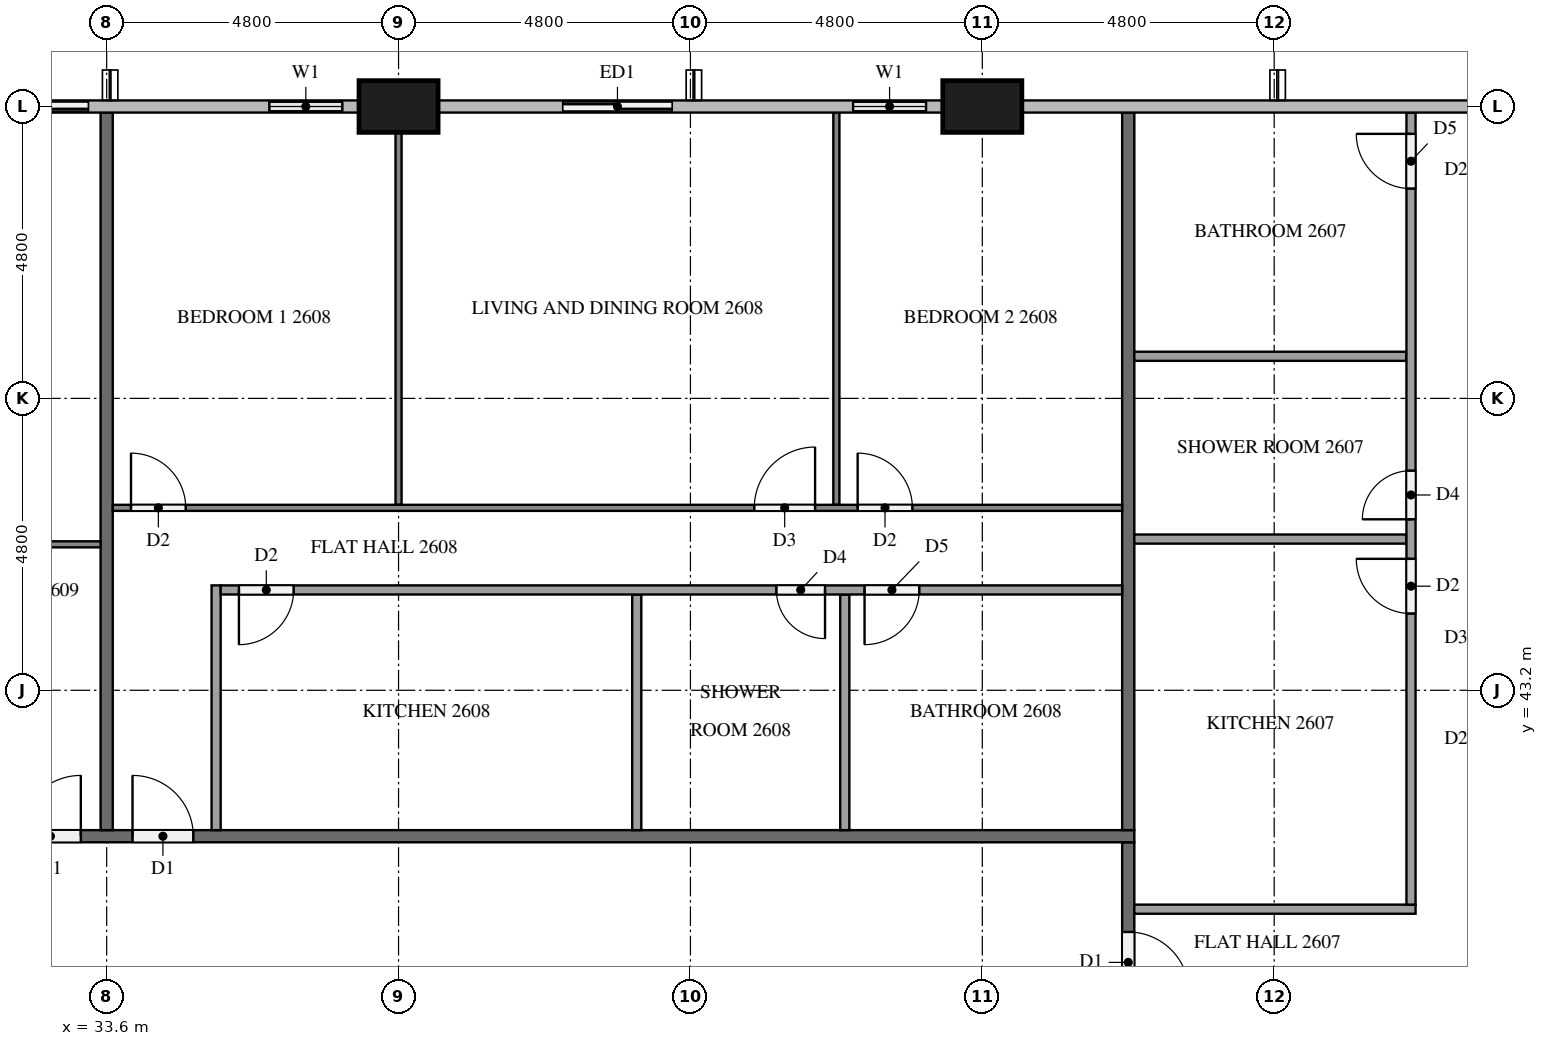
"""IFC4 building model, lengths in metres.
Left out: names, types, materials, properties, quantities, classifications, styles, units other than length and angle.
Written with IfcOpenShell. Run it as: python <this file> out.ifc"""

import sys

from ifc_helpers import new_model, si_unit, direction, frame, frame_2d, origin, origin_2d, place, context, subcontext, project, spatial, rectangle, extrude, element, fill, save


model = new_model("IFC4")
c1 = context("Model", 3, precision=1e-05, world=origin(), true_north=direction((0.0, 1.0)))
c2 = subcontext(c1, "Body", "Model", "MODEL_VIEW")
j1 = project(units=[si_unit("LENGTHUNIT", "METRE"), si_unit("PLANEANGLEUNIT", "RADIAN")], contexts=[c1])
p1 = place(None, origin())
s1 = spatial("IfcSite", under=j1, at=p1, CompositionType="ELEMENT")
p2 = place(p1, origin())
s2 = spatial("IfcBuilding", under=s1, at=p2, CompositionType="ELEMENT")
p3 = place(p2, frame((0.0, 0.0, 103.2)))
s3 = spatial("IfcBuildingStorey", under=s2, at=p3, CompositionType="ELEMENT", Elevation=103.2)
for number, where, z_axis, x_axis in (
    (1, (48.0, 52.8, 0.0), (0.0, 0.0, 1.0), (1.0, 0.0, 0.0)),
    (2, (38.4, 52.8, 0.0), (0.0, 0.0, 1.0), (1.0, 0.0, 0.0)),
):
    element("IfcColumn", number, at=place(p3, frame(where, z_axis=z_axis, x_axis=x_axis)), inside=s3, PredefinedType="COLUMN", context=c2, shape_type="SweptSolid", body=[
        extrude(rectangle(XDim=1.3, YDim=0.85, at=origin_2d()), origin(), (0.0, 0.0, 1.0), 3.2),
    ])
p4 = place(p3, frame((47.35, 52.8, 0.0), z_axis=(0.0, 0.0, 1.0), x_axis=(-1.0, 0.0, 0.0)))
e3 = element("IfcWall", 3, at=p4, inside=s3, PredefinedType="SOLIDWALL", context=c2, shape_type="SweptSolid", body=[
    extrude(rectangle(XDim=1.75, YDim=0.15, at=frame_2d((0.875, 0.0))), origin(), (0.0, 0.0, 1.0), 3.2),
])
p5 = place(p4, frame((0.275, 0.0, 0.9)))
e4 = element("IfcOpeningElement", 4, at=p5, cuts=e3, PredefinedType="OPENING", context=c2, shape_type="SweptSolid", body=[
    extrude(rectangle(XDim=1.2, YDim=1.4, at=frame_2d((0.6, 0.7))), frame((0.0, 0.085, 0.0), z_axis=(0.0, -1.0, 0.0), x_axis=(1.0, 0.0, 0.0)), (0.0, 0.0, 1.0), 0.17),
])
p6 = place(p3, frame((43.2, 52.8, 0.0), z_axis=(0.0, 0.0, 1.0), x_axis=(-1.0, 0.0, 0.0)))
e5 = element("IfcWall", 5, at=p6, inside=s3, PredefinedType="SOLIDWALL", context=c2, shape_type="SweptSolid", body=[
    extrude(rectangle(XDim=2.4, YDim=0.15, at=frame_2d((1.2, 0.0))), origin(), (0.0, 0.0, 1.0), 3.2),
])
p7 = place(p6, frame((0.3, 0.0, 0.0)))
e6 = element("IfcOpeningElement", 6, at=p7, cuts=e5, PredefinedType="OPENING", context=c2, shape_type="SweptSolid", body=[
    extrude(rectangle(XDim=1.8, YDim=2.4, at=frame_2d((0.9, 1.2))), frame((0.0, 0.085, 0.0), z_axis=(0.0, -1.0, 0.0), x_axis=(1.0, 0.0, 0.0)), (0.0, 0.0, 1.0), 0.17),
])
p8 = place(p3, frame((37.75, 52.8, 0.0), z_axis=(0.0, 0.0, 1.0), x_axis=(-1.0, 0.0, 0.0)))
e7 = element("IfcWall", 7, at=p8, inside=s3, PredefinedType="SOLIDWALL", context=c2, shape_type="SweptSolid", body=[
    extrude(rectangle(XDim=1.75, YDim=0.15, at=frame_2d((0.875, 0.0))), origin(), (0.0, 0.0, 1.0), 3.2),
])
p9 = place(p8, frame((0.275, 0.0, 0.9)))
e8 = element("IfcOpeningElement", 8, at=p9, cuts=e7, PredefinedType="OPENING", context=c2, shape_type="SweptSolid", body=[
    extrude(rectangle(XDim=1.2, YDim=1.4, at=frame_2d((0.6, 0.7))), frame((0.0, 0.085, 0.0), z_axis=(0.0, -1.0, 0.0), x_axis=(1.0, 0.0, 0.0)), (0.0, 0.0, 1.0), 0.17),
])
p10 = place(p3, frame((33.6, 52.8, 0.0), z_axis=(0.0, 0.0, 1.0), x_axis=(-1.0, 0.0, 0.0)))
e9 = element("IfcWall", 9, at=p10, inside=s3, PredefinedType="SOLIDWALL", context=c2, shape_type="SweptSolid", body=[
    extrude(rectangle(XDim=2.4, YDim=0.15, at=frame_2d((1.2, 0.0))), origin(), (0.0, 0.0, 1.0), 3.2),
])
p11 = place(p10, frame((0.3, 0.0, 0.0)))
e10 = element("IfcOpeningElement", 10, at=p11, cuts=e9, PredefinedType="OPENING", context=c2, shape_type="SweptSolid", body=[
    extrude(rectangle(XDim=1.8, YDim=2.4, at=frame_2d((0.9, 1.2))), frame((0.0, 0.085, 0.0), z_axis=(0.0, -1.0, 0.0), x_axis=(1.0, 0.0, 0.0)), (0.0, 0.0, 1.0), 0.17),
])
p12 = place(p3, frame((50.4, 40.7, 0.0), z_axis=(0.0, 0.0, 1.0), x_axis=(0.0, -1.0, 0.0)))
e11 = element("IfcWall", 11, at=p12, inside=s3, PredefinedType="PARTITIONING", context=c2, shape_type="SweptSolid", body=[
    extrude(rectangle(XDim=2.8, YDim=0.2, at=frame_2d((1.4, 0.0))), origin(), (0.0, 0.0, 1.0), 3.2),
])
p13 = place(p12, frame((1.475, 0.0, 0.0)))
e12 = element("IfcOpeningElement", 12, at=p13, cuts=e11, PredefinedType="OPENING", context=c2, shape_type="SweptSolid", body=[
    extrude(rectangle(XDim=1.0, YDim=2.1, at=frame_2d((0.5, 1.05))), frame((0.0, 0.11, 0.0), z_axis=(0.0, -1.0, 0.0), x_axis=(1.0, 0.0, 0.0)), (0.0, 0.0, 1.0), 0.22),
])
p14 = place(p3, frame((11.9, 40.8, 0.0), z_axis=(0.0, 0.0, 1.0), x_axis=(1.0, 0.0, 0.0)))
e13 = element("IfcWall", 13, at=p14, inside=s3, PredefinedType="PARTITIONING", context=c2, shape_type="SweptSolid", body=[
    extrude(rectangle(XDim=38.6, YDim=0.2, at=frame_2d((19.3, 0.0))), origin(), (0.0, 0.0, 1.0), 3.2),
])
p15 = place(p14, frame((22.125, 0.0, 0.0)))
e14 = element("IfcOpeningElement", 14, at=p15, cuts=e13, PredefinedType="OPENING", context=c2, shape_type="SweptSolid", body=[
    extrude(rectangle(XDim=1.0, YDim=2.1, at=frame_2d((0.5, 1.05))), frame((0.0, 0.11, 0.0), z_axis=(0.0, -1.0, 0.0), x_axis=(1.0, 0.0, 0.0)), (0.0, 0.0, 1.0), 0.22),
])
p16 = place(p14, frame((20.275, 0.0, 0.0)))
e15 = element("IfcOpeningElement", 15, at=p16, cuts=e13, PredefinedType="OPENING", context=c2, shape_type="SweptSolid", body=[
    extrude(rectangle(XDim=1.0, YDim=2.1, at=frame_2d((0.5, 1.05))), frame((0.0, 0.11, 0.0), z_axis=(0.0, -1.0, 0.0), x_axis=(1.0, 0.0, 0.0)), (0.0, 0.0, 1.0), 0.22),
])
p17 = place(p14, frame((0.525, 0.0, 0.0)))
e16 = element("IfcOpeningElement", 16, at=p17, cuts=e13, PredefinedType="OPENING", context=c2, shape_type="SweptSolid", body=[
    extrude(rectangle(XDim=1.0, YDim=2.1, at=frame_2d((0.5, 1.05))), frame((0.0, 0.11, 0.0), z_axis=(0.0, -1.0, 0.0), x_axis=(1.0, 0.0, 0.0)), (0.0, 0.0, 1.0), 0.22),
])
for number, where, z_axis, x_axis in (
    (17, (50.4, 40.9, 0.0), (0.0, 0.0, 1.0), (0.0, 1.0, 0.0)),
    (18, (33.6, 52.7, 0.0), (0.0, 0.0, 1.0), (0.0, -1.0, 0.0)),
):
    element("IfcWall", number, at=place(p3, frame(where, z_axis=z_axis, x_axis=x_axis)), inside=s3, PredefinedType="PARTITIONING", context=c2, shape_type="SweptSolid", body=[
        extrude(rectangle(XDim=11.8, YDim=0.2, at=frame_2d((5.9, 0.0))), origin(), (0.0, 0.0, 1.0), 3.2),
    ])
for number, where, z_axis, x_axis in (
    (19, (50.5, 45.687, 0.0), (0.0, 0.0, 1.0), (1.0, 0.0, 0.0)),
    (20, (50.5, 48.692, 0.0), (0.0, 0.0, 1.0), (1.0, 0.0, 0.0)),
):
    element("IfcWall", number, at=place(p3, frame(where, z_axis=z_axis, x_axis=x_axis)), inside=s3, PredefinedType="PARTITIONING", context=c2, shape_type="SweptSolid", body=[
        extrude(rectangle(XDim=4.475, YDim=0.15, at=frame_2d((2.238, 0.0))), origin(), (0.0, 0.0, 1.0), 3.2),
    ])
p18 = place(p3, frame((50.5, 39.6, 0.0), z_axis=(0.0, 0.0, 1.0), x_axis=(1.0, 0.0, 0.0)))
e21 = element("IfcWall", 21, at=p18, inside=s3, PredefinedType="PARTITIONING", context=c2, shape_type="SweptSolid", body=[
    extrude(rectangle(XDim=4.625, YDim=0.15, at=frame_2d((2.312, 0.0))), origin(), (0.0, 0.0, 1.0), 3.2),
])
p19 = place(p3, frame((55.05, 39.675, 0.0), z_axis=(0.0, 0.0, 1.0), x_axis=(0.0, 1.0, 0.0)))
e22 = element("IfcWall", 22, at=p19, inside=s3, PredefinedType="PARTITIONING", context=c2, shape_type="SweptSolid", body=[
    extrude(rectangle(XDim=13.025, YDim=0.15, at=frame_2d((6.512, 0.0))), origin(), (0.0, 0.0, 1.0), 3.2),
])
p20 = place(p19, frame((4.787, 0.0, 0.0)))
e23 = element("IfcOpeningElement", 23, at=p20, cuts=e22, PredefinedType="OPENING", context=c2, shape_type="SweptSolid", body=[
    extrude(rectangle(XDim=0.9, YDim=2.1, at=frame_2d((0.45, 1.05))), frame((0.0, 0.085, 0.0), z_axis=(0.0, -1.0, 0.0), x_axis=(1.0, 0.0, 0.0)), (0.0, 0.0, 1.0), 0.17),
])
p21 = place(p19, frame((6.336, 0.0, 0.0)))
e24 = element("IfcOpeningElement", 24, at=p21, cuts=e22, PredefinedType="OPENING", context=c2, shape_type="SweptSolid", body=[
    extrude(rectangle(XDim=0.8, YDim=2.1, at=frame_2d((0.4, 1.05))), frame((0.0, 0.085, 0.0), z_axis=(0.0, -1.0, 0.0), x_axis=(1.0, 0.0, 0.0)), (0.0, 0.0, 1.0), 0.17),
])
p22 = place(p19, frame((11.775, 0.0, 0.0)))
e25 = element("IfcOpeningElement", 25, at=p22, cuts=e22, PredefinedType="OPENING", context=c2, shape_type="SweptSolid", body=[
    extrude(rectangle(XDim=0.9, YDim=2.1, at=frame_2d((0.45, 1.05))), frame((0.0, 0.085, 0.0), z_axis=(0.0, -1.0, 0.0), x_axis=(1.0, 0.0, 0.0)), (0.0, 0.0, 1.0), 0.17),
])
p23 = place(p3, frame((38.4, 46.25, 0.0), z_axis=(0.0, 0.0, 1.0), x_axis=(0.0, 1.0, 0.0)))
e26 = element("IfcWall", 26, at=p23, inside=s3, PredefinedType="PARTITIONING", context=c2, shape_type="SweptSolid", body=[
    extrude(rectangle(XDim=6.125, YDim=0.1, at=frame_2d((3.062, 0.0))), origin(), (0.0, 0.0, 1.0), 3.2),
])
p24 = place(p3, frame((45.6, 46.25, 0.0), z_axis=(0.0, 0.0, 1.0), x_axis=(0.0, 1.0, 0.0)))
e27 = element("IfcWall", 27, at=p24, inside=s3, PredefinedType="PARTITIONING", context=c2, shape_type="SweptSolid", body=[
    extrude(rectangle(XDim=6.45, YDim=0.1, at=frame_2d((3.225, 0.0))), origin(), (0.0, 0.0, 1.0), 3.2),
])
p25 = place(p3, frame((33.7, 46.2, 0.0), z_axis=(0.0, 0.0, 1.0), x_axis=(1.0, 0.0, 0.0)))
e28 = element("IfcWall", 28, at=p25, inside=s3, PredefinedType="PARTITIONING", context=c2, shape_type="SweptSolid", body=[
    extrude(rectangle(XDim=16.6, YDim=0.1, at=frame_2d((8.3, 0.0))), origin(), (0.0, 0.0, 1.0), 3.2),
])
p26 = place(p25, frame((0.3, 0.0, 0.0)))
e29 = element("IfcOpeningElement", 29, at=p26, cuts=e28, PredefinedType="OPENING", context=c2, shape_type="SweptSolid", body=[
    extrude(rectangle(XDim=0.9, YDim=2.1, at=frame_2d((0.45, 1.05))), frame((0.0, 0.06, 0.0), z_axis=(0.0, -1.0, 0.0), x_axis=(1.0, 0.0, 0.0)), (0.0, 0.0, 1.0), 0.12),
])
p27 = place(p25, frame((10.55, 0.0, 0.0)))
e30 = element("IfcOpeningElement", 30, at=p27, cuts=e28, PredefinedType="OPENING", context=c2, shape_type="SweptSolid", body=[
    extrude(rectangle(XDim=1.0, YDim=2.1, at=frame_2d((0.5, 1.05))), frame((0.0, 0.06, 0.0), z_axis=(0.0, -1.0, 0.0), x_axis=(1.0, 0.0, 0.0)), (0.0, 0.0, 1.0), 0.12),
])
p28 = place(p25, frame((12.25, 0.0, 0.0)))
e31 = element("IfcOpeningElement", 31, at=p28, cuts=e28, PredefinedType="OPENING", context=c2, shape_type="SweptSolid", body=[
    extrude(rectangle(XDim=0.9, YDim=2.1, at=frame_2d((0.45, 1.05))), frame((0.0, 0.06, 0.0), z_axis=(0.0, -1.0, 0.0), x_axis=(1.0, 0.0, 0.0)), (0.0, 0.0, 1.0), 0.12),
])
for number, where, z_axis, x_axis in (
    (32, (42.317, 40.9, 0.0), (0.0, 0.0, 1.0), (0.0, 1.0, 0.0)),
    (33, (45.739, 40.9, 0.0), (0.0, 0.0, 1.0), (0.0, 1.0, 0.0)),
):
    element("IfcWall", number, at=place(p3, frame(where, z_axis=z_axis, x_axis=x_axis)), inside=s3, PredefinedType="PARTITIONING", context=c2, shape_type="SweptSolid", body=[
        extrude(rectangle(XDim=3.875, YDim=0.15, at=frame_2d((1.938, 0.0))), origin(), (0.0, 0.0, 1.0), 3.2),
    ])
p29 = place(p3, frame((35.4, 40.9, 0.0), z_axis=(0.0, 0.0, 1.0), x_axis=(0.0, 1.0, 0.0)))
e34 = element("IfcWall", 34, at=p29, inside=s3, PredefinedType="PARTITIONING", context=c2, shape_type="SweptSolid", body=[
    extrude(rectangle(XDim=4.025, YDim=0.15, at=frame_2d((2.013, 0.0))), origin(), (0.0, 0.0, 1.0), 3.2),
])
p30 = place(p3, frame((50.3, 44.85, 0.0), z_axis=(0.0, 0.0, 1.0), x_axis=(-1.0, 0.0, 0.0)))
e35 = element("IfcWall", 35, at=p30, inside=s3, PredefinedType="PARTITIONING", context=c2, shape_type="SweptSolid", body=[
    extrude(rectangle(XDim=14.825, YDim=0.15, at=frame_2d((7.413, 0.0))), origin(), (0.0, 0.0, 1.0), 3.2),
])
p31 = place(p30, frame((13.625, 0.0, 0.0)))
e36 = element("IfcOpeningElement", 36, at=p31, cuts=e35, PredefinedType="OPENING", context=c2, shape_type="SweptSolid", body=[
    extrude(rectangle(XDim=0.9, YDim=2.1, at=frame_2d((0.45, 1.05))), frame((0.0, 0.085, 0.0), z_axis=(0.0, -1.0, 0.0), x_axis=(1.0, 0.0, 0.0)), (0.0, 0.0, 1.0), 0.17),
])
p32 = place(p30, frame((4.886, 0.0, 0.0)))
e37 = element("IfcOpeningElement", 37, at=p32, cuts=e35, PredefinedType="OPENING", context=c2, shape_type="SweptSolid", body=[
    extrude(rectangle(XDim=0.8, YDim=2.1, at=frame_2d((0.4, 1.05))), frame((0.0, 0.085, 0.0), z_axis=(0.0, -1.0, 0.0), x_axis=(1.0, 0.0, 0.0)), (0.0, 0.0, 1.0), 0.17),
])
p33 = place(p30, frame((3.336, 0.0, 0.0)))
e38 = element("IfcOpeningElement", 38, at=p33, cuts=e35, PredefinedType="OPENING", context=c2, shape_type="SweptSolid", body=[
    extrude(rectangle(XDim=0.9, YDim=2.1, at=frame_2d((0.45, 1.05))), frame((0.0, 0.085, 0.0), z_axis=(0.0, -1.0, 0.0), x_axis=(1.0, 0.0, 0.0)), (0.0, 0.0, 1.0), 0.17),
])
p34 = place(p3, frame((21.7, 45.6, 0.0), z_axis=(0.0, 0.0, 1.0), x_axis=(1.0, 0.0, 0.0)))
e39 = element("IfcWall", 39, at=p34, inside=s3, PredefinedType="PARTITIONING", context=c2, shape_type="SweptSolid", body=[
    extrude(rectangle(XDim=11.8, YDim=0.1, at=frame_2d((5.9, 0.0))), origin(), (0.0, 0.0, 1.0), 3.2),
])
p35 = place(p34, frame((5.05, 0.0, 0.0)))
e40 = element("IfcOpeningElement", 40, at=p35, cuts=e39, PredefinedType="OPENING", context=c2, shape_type="SweptSolid", body=[
    extrude(rectangle(XDim=1.0, YDim=2.1, at=frame_2d((0.5, 1.05))), frame((0.0, 0.06, 0.0), z_axis=(0.0, -1.0, 0.0), x_axis=(1.0, 0.0, 0.0)), (0.0, 0.0, 1.0), 0.12),
])
p36 = place(p34, frame((3.45, 0.0, 0.0)))
e41 = element("IfcOpeningElement", 41, at=p36, cuts=e39, PredefinedType="OPENING", context=c2, shape_type="SweptSolid", body=[
    extrude(rectangle(XDim=0.9, YDim=2.1, at=frame_2d((0.45, 1.05))), frame((0.0, 0.06, 0.0), z_axis=(0.0, -1.0, 0.0), x_axis=(1.0, 0.0, 0.0)), (0.0, 0.0, 1.0), 0.12),
])
p37 = place(p5, origin())
e42 = element("IfcWindow", 42, at=p37, inside=s3, PartitioningType="SINGLE_PANEL", PredefinedType="WINDOW", context=c2, shape_type="SweptSolid", body=[
    extrude(rectangle(XDim=1.2, YDim=1.4, at=frame_2d((0.6, 0.7))), frame((0.0, 0.03, 0.0), z_axis=(0.0, -1.0, 0.0), x_axis=(1.0, 0.0, 0.0)), (0.0, 0.0, 1.0), 0.06),
])
fill(e4, e42)
p38 = place(p7, origin())
e43 = element("IfcDoor", 43, at=p38, inside=s3, OperationType="SLIDING_TO_RIGHT", PredefinedType="DOOR", context=c2, shape_type="SweptSolid", body=[
    extrude(rectangle(XDim=1.8, YDim=2.4, at=frame_2d((0.9, 1.2))), frame((0.0, 0.025, 0.0), z_axis=(0.0, -1.0, 0.0), x_axis=(1.0, 0.0, 0.0)), (0.0, 0.0, 1.0), 0.05),
])
fill(e6, e43)
p39 = place(p9, origin())
e44 = element("IfcWindow", 44, at=p39, inside=s3, PartitioningType="SINGLE_PANEL", PredefinedType="WINDOW", context=c2, shape_type="SweptSolid", body=[
    extrude(rectangle(XDim=1.2, YDim=1.4, at=frame_2d((0.6, 0.7))), frame((0.0, 0.03, 0.0), z_axis=(0.0, -1.0, 0.0), x_axis=(1.0, 0.0, 0.0)), (0.0, 0.0, 1.0), 0.06),
])
fill(e8, e44)
p40 = place(p11, origin())
e45 = element("IfcDoor", 45, at=p40, inside=s3, OperationType="SLIDING_TO_LEFT", PredefinedType="DOOR", context=c2, shape_type="SweptSolid", body=[
    extrude(rectangle(XDim=1.8, YDim=2.4, at=frame_2d((0.9, 1.2))), frame((0.0, 0.025, 0.0), z_axis=(0.0, -1.0, 0.0), x_axis=(1.0, 0.0, 0.0)), (0.0, 0.0, 1.0), 0.05),
])
fill(e10, e45)
p41 = place(p13, origin())
e46 = element("IfcDoor", 46, at=p41, inside=s3, OperationType="SINGLE_SWING_RIGHT", PredefinedType="DOOR", context=c2, shape_type="SweptSolid", body=[
    extrude(rectangle(XDim=1.0, YDim=2.1, at=frame_2d((0.5, 1.05))), frame((0.0, 0.025, 0.0), z_axis=(0.0, -1.0, 0.0), x_axis=(1.0, 0.0, 0.0)), (0.0, 0.0, 1.0), 0.05),
])
fill(e12, e46)
p42 = place(p15, origin())
e47 = element("IfcDoor", 47, at=p42, inside=s3, OperationType="SINGLE_SWING_LEFT", PredefinedType="DOOR", context=c2, shape_type="SweptSolid", body=[
    extrude(rectangle(XDim=1.0, YDim=2.1, at=frame_2d((0.5, 1.05))), frame((0.0, 0.025, 0.0), z_axis=(0.0, -1.0, 0.0), x_axis=(1.0, 0.0, 0.0)), (0.0, 0.0, 1.0), 0.05),
])
fill(e14, e47)
p43 = place(p16, origin())
e48 = element("IfcDoor", 48, at=p43, inside=s3, OperationType="SINGLE_SWING_RIGHT", PredefinedType="DOOR", context=c2, shape_type="SweptSolid", body=[
    extrude(rectangle(XDim=1.0, YDim=2.1, at=frame_2d((0.5, 1.05))), frame((0.0, 0.025, 0.0), z_axis=(0.0, -1.0, 0.0), x_axis=(1.0, 0.0, 0.0)), (0.0, 0.0, 1.0), 0.05),
])
fill(e15, e48)
p44 = place(p20, origin())
e49 = element("IfcDoor", 49, at=p44, inside=s3, OperationType="SINGLE_SWING_RIGHT", PredefinedType="DOOR", context=c2, shape_type="SweptSolid", body=[
    extrude(rectangle(XDim=0.9, YDim=2.1, at=frame_2d((0.45, 1.05))), frame((0.0, 0.025, 0.0), z_axis=(0.0, -1.0, 0.0), x_axis=(1.0, 0.0, 0.0)), (0.0, 0.0, 1.0), 0.05),
])
fill(e23, e49)
p45 = place(p21, origin())
e50 = element("IfcDoor", 50, at=p45, inside=s3, OperationType="SINGLE_SWING_LEFT", PredefinedType="DOOR", context=c2, shape_type="SweptSolid", body=[
    extrude(rectangle(XDim=0.8, YDim=2.1, at=frame_2d((0.4, 1.05))), frame((0.0, 0.025, 0.0), z_axis=(0.0, -1.0, 0.0), x_axis=(1.0, 0.0, 0.0)), (0.0, 0.0, 1.0), 0.05),
])
fill(e24, e50)
p46 = place(p22, origin())
e51 = element("IfcDoor", 51, at=p46, inside=s3, OperationType="SINGLE_SWING_RIGHT", PredefinedType="DOOR", context=c2, shape_type="SweptSolid", body=[
    extrude(rectangle(XDim=0.9, YDim=2.1, at=frame_2d((0.45, 1.05))), frame((0.0, 0.025, 0.0), z_axis=(0.0, -1.0, 0.0), x_axis=(1.0, 0.0, 0.0)), (0.0, 0.0, 1.0), 0.05),
])
fill(e25, e51)
p47 = place(p26, origin())
e52 = element("IfcDoor", 52, at=p47, inside=s3, OperationType="SINGLE_SWING_LEFT", PredefinedType="DOOR", context=c2, shape_type="SweptSolid", body=[
    extrude(rectangle(XDim=0.9, YDim=2.1, at=frame_2d((0.45, 1.05))), frame((0.0, 0.025, 0.0), z_axis=(0.0, -1.0, 0.0), x_axis=(1.0, 0.0, 0.0)), (0.0, 0.0, 1.0), 0.05),
])
fill(e29, e52)
p48 = place(p27, origin())
e53 = element("IfcDoor", 53, at=p48, inside=s3, OperationType="SINGLE_SWING_RIGHT", PredefinedType="DOOR", context=c2, shape_type="SweptSolid", body=[
    extrude(rectangle(XDim=1.0, YDim=2.1, at=frame_2d((0.5, 1.05))), frame((0.0, 0.025, 0.0), z_axis=(0.0, -1.0, 0.0), x_axis=(1.0, 0.0, 0.0)), (0.0, 0.0, 1.0), 0.05),
])
fill(e30, e53)
p49 = place(p28, origin())
e54 = element("IfcDoor", 54, at=p49, inside=s3, OperationType="SINGLE_SWING_LEFT", PredefinedType="DOOR", context=c2, shape_type="SweptSolid", body=[
    extrude(rectangle(XDim=0.9, YDim=2.1, at=frame_2d((0.45, 1.05))), frame((0.0, 0.025, 0.0), z_axis=(0.0, -1.0, 0.0), x_axis=(1.0, 0.0, 0.0)), (0.0, 0.0, 1.0), 0.05),
])
fill(e31, e54)
p50 = place(p31, origin())
e55 = element("IfcDoor", 55, at=p50, inside=s3, OperationType="SINGLE_SWING_RIGHT", PredefinedType="DOOR", context=c2, shape_type="SweptSolid", body=[
    extrude(rectangle(XDim=0.9, YDim=2.1, at=frame_2d((0.45, 1.05))), frame((0.0, 0.025, 0.0), z_axis=(0.0, -1.0, 0.0), x_axis=(1.0, 0.0, 0.0)), (0.0, 0.0, 1.0), 0.05),
])
fill(e36, e55)
p51 = place(p32, origin())
e56 = element("IfcDoor", 56, at=p51, inside=s3, OperationType="SINGLE_SWING_LEFT", PredefinedType="DOOR", context=c2, shape_type="SweptSolid", body=[
    extrude(rectangle(XDim=0.8, YDim=2.1, at=frame_2d((0.4, 1.05))), frame((0.0, 0.025, 0.0), z_axis=(0.0, -1.0, 0.0), x_axis=(1.0, 0.0, 0.0)), (0.0, 0.0, 1.0), 0.05),
])
fill(e37, e56)
p52 = place(p33, origin())
e57 = element("IfcDoor", 57, at=p52, inside=s3, OperationType="SINGLE_SWING_RIGHT", PredefinedType="DOOR", context=c2, shape_type="SweptSolid", body=[
    extrude(rectangle(XDim=0.9, YDim=2.1, at=frame_2d((0.45, 1.05))), frame((0.0, 0.025, 0.0), z_axis=(0.0, -1.0, 0.0), x_axis=(1.0, 0.0, 0.0)), (0.0, 0.0, 1.0), 0.05),
])
fill(e38, e57)
save(model, sys.argv[1])
